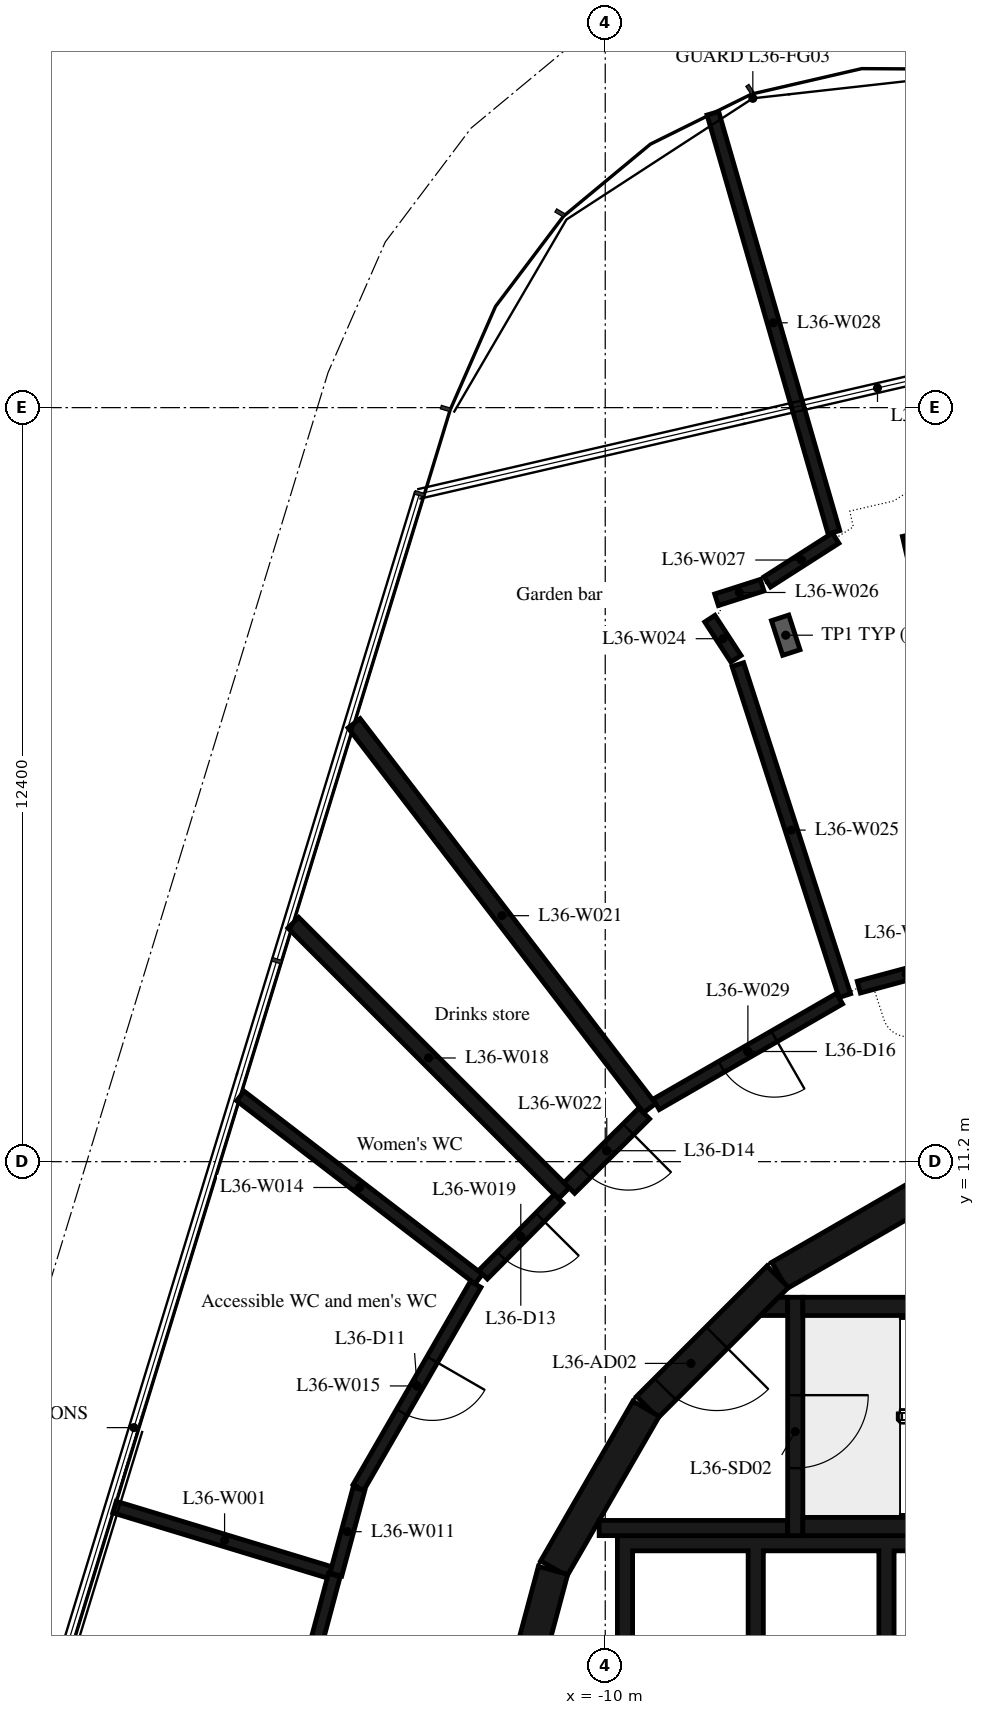
"""IFC4 building model, lengths in metres.
Left out: names, types, materials, properties, quantities, classifications, styles, units other than length and angle.
Written with IfcOpenShell. Run it as: python <this file> out.ifc"""

import sys

from ifc_helpers import new_model, si_unit, direction, frame, frame_2d, origin, place, context, subcontext, project, spatial, polyline, rectangle, outline, extrude, element, fill, save


model = new_model("IFC4")
c1 = context("Model", 3, precision=1e-05, world=origin(), true_north=direction((0.0, 1.0)))
c2 = subcontext(c1, "Body", "Model", "MODEL_VIEW")
j1 = project(units=[si_unit("LENGTHUNIT", "METRE"), si_unit("PLANEANGLEUNIT", "RADIAN")], contexts=[c1])
p1 = place(None, origin())
s1 = spatial("IfcSite", under=j1, at=p1, CompositionType="ELEMENT")
p2 = place(p1, origin())
s2 = spatial("IfcBuilding", under=s1, at=p2, CompositionType="ELEMENT")
p3 = place(p2, frame((0.0, 0.0, 144.9)))
s3 = spatial("IfcBuildingStorey", under=s2, at=p3, CompositionType="ELEMENT", Elevation=144.9)
p4 = place(p3, frame((-4.51, 10.845, 0.0), z_axis=(0.0, 0.0, 1.0), x_axis=(-0.865975092491, -0.500087131594, 0.0)))
e1 = element("IfcWall", 1, at=p4, inside=s3, PredefinedType="SHEAR", context=c2, shape_type="SweptSolid", body=[
    extrude(rectangle(XDim=3.033, YDim=0.5, at=frame_2d((1.516, 0.0))), origin(), (0.0, 0.0, 1.0), 6.35),
])
p5 = place(p3, frame((-7.164, 9.308, 0.0), z_axis=(0.0, 0.0, 1.0), x_axis=(-0.707106781187, -0.707106781187, 0.0)))
e2 = element("IfcWall", 2, at=p5, inside=s3, PredefinedType="SHEAR", context=c2, shape_type="SweptSolid", body=[
    extrude(rectangle(XDim=3.032, YDim=0.5, at=frame_2d((1.516, 0.0))), origin(), (0.0, 0.0, 1.0), 6.35),
])
p6 = place(p5, frame((1.416, 0.0, 0.0)))
e3 = element("IfcOpeningElement", 3, at=p6, cuts=e2, PredefinedType="OPENING", context=c2, shape_type="SweptSolid", body=[
    extrude(rectangle(XDim=1.2, YDim=2.1, at=frame_2d((0.6, 1.05))), frame((0.0, 0.26, 0.0), z_axis=(0.0, -1.0, 0.0), x_axis=(1.0, 0.0, 0.0)), (0.0, 0.0, 1.0), 0.52),
])
for number, where, z_axis, x_axis in (
    (4, (-9.329, 7.137, 0.0), (0.0, 0.0, 1.0), (-0.5, -0.866, 0.0)),
    (5, (-10.858, 4.479, 0.0), (0.0, 0.0, 1.0), (-0.259, -0.966, 0.0)),
):
    element("IfcWall", number, at=place(p3, frame(where, z_axis=z_axis, x_axis=x_axis)), inside=s3, PredefinedType="SHEAR", context=c2, shape_type="SweptSolid", body=[
        extrude(rectangle(XDim=3.033, YDim=0.5, at=frame_2d((1.516, 0.0))), origin(), (0.0, 0.0, 1.0), 6.35),
    ])
for number, where, z_axis, x_axis in (
    (6, (-6.75, 5.2, 0.0), (0.0, 0.0, 1.0), (1.0, 0.0, 0.0)),
    (7, (-6.75, 8.82, 0.0), (0.0, 0.0, 1.0), (1.0, 0.0, 0.0)),
):
    element("IfcWall", number, at=place(p3, frame(where, z_axis=z_axis, x_axis=x_axis)), inside=s3, PredefinedType="SHEAR", context=c2, shape_type="SweptSolid", body=[
        extrude(rectangle(XDim=6.75, YDim=0.3, at=frame_2d((3.375, 0.0))), origin(), (0.0, 0.0, 1.0), 6.35),
    ])
p7 = place(p3, frame((-6.875, 8.97, 0.0), z_axis=(0.0, 0.0, 1.0), x_axis=(0.0, -1.0, 0.0)))
e8 = element("IfcWall", 8, at=p7, inside=s3, PredefinedType="SHEAR", context=c2, shape_type="SweptSolid", body=[
    extrude(rectangle(XDim=3.92, YDim=0.25, at=frame_2d((1.96, 0.0))), origin(), (0.0, 0.0, 1.0), 6.35),
])
p8 = place(p7, frame((1.61, 0.0, 0.0)))
e9 = element("IfcOpeningElement", 9, at=p8, cuts=e8, PredefinedType="OPENING", context=c2, shape_type="SweptSolid", body=[
    extrude(rectangle(XDim=1.2, YDim=2.1, at=frame_2d((0.6, 1.05))), frame((0.0, 0.135, 0.0), z_axis=(0.0, -1.0, 0.0), x_axis=(1.0, 0.0, 0.0)), (0.0, 0.0, 1.0), 0.27),
])
p9 = place(p3, frame((-7.0, 5.175, 0.0), z_axis=(0.0, 0.0, 1.0), x_axis=(-1.0, 0.0, 0.0)))
e10 = element("IfcWall", 10, at=p9, inside=s3, PredefinedType="SHEAR", context=c2, shape_type="SweptSolid", body=[
    extrude(rectangle(XDim=3.1, YDim=0.25, at=frame_2d((1.55, 0.0))), origin(), (0.0, 0.0, 1.0), 6.35),
])
p10 = place(p3, origin())
e11 = element("IfcWall", 11, at=p10, inside=s3, PredefinedType="SHEAR", context=c2, shape_type="SweptSolid", body=[
    extrude(outline(polyline([(-7.148, 8.97), (-7.0, 8.97), (-7.0, 8.67), (-7.448, 8.67), (-7.148, 8.97)])), origin(), (0.0, 0.0, 1.0), 6.35),
])
p11 = place(p3, origin())
e12 = element("IfcWall", 12, at=p11, inside=s3, PredefinedType="SHEAR", context=c2, shape_type="SweptSolid", body=[
    extrude(outline(polyline([(-9.55, 4.8), (-7.65, 4.8), (-7.65, 1.9), (-7.4, 1.9), (-7.4, 4.8), (-5.5, 4.8), (-5.5, 1.9), (-5.25, 1.9), (-5.25, 4.8), (-3.35, 4.8), (-3.35, 1.9), (-3.1, 1.9), (-3.1, 4.8), (-1.2, 4.8), (-1.2, 1.9), (-0.95, 1.9), (-0.95, 4.8), (0.95, 4.8), (0.95, 1.9), (1.2, 1.9), (1.2, 4.8), (3.1, 4.8), (3.1, 1.9), (3.35, 1.9), (3.35, 4.8), (5.25, 4.8), (5.25, 1.9), (5.5, 1.9), (5.5, 4.8), (7.4, 4.8), (7.4, 1.9), (7.65, 1.9), (7.65, 4.8), (9.55, 4.8), (9.55, 1.9), (9.8, 1.9), (9.8, 4.8), (9.8, 5.05), (-9.8, 5.05), (-9.8, 4.8), (-9.8, 1.9), (-9.55, 1.9), (-9.55, 4.8)])), origin(), (0.0, 0.0, 1.0), 6.35),
])
p12 = place(p3, frame((-18.07, 5.52, 0.0), z_axis=(0.0, 0.0, 1.0), x_axis=(0.956797265316, -0.290755899482, 0.0)))
e13 = element("IfcWall", 13, at=p12, inside=s3, PredefinedType="PARTITIONING", context=c2, shape_type="SweptSolid", body=[
    extrude(rectangle(XDim=3.784, YDim=0.2, at=frame_2d((1.892, 0.0))), origin(), (0.0, 0.0, 1.0), 6.35),
])
p13 = place(p3, frame((-14.455, 4.402, 0.0), z_axis=(0.0, 0.0, 1.0), x_axis=(-0.258467872824, -0.966019854205, 0.0)))
e14 = element("IfcWall", 14, at=p13, inside=s3, PredefinedType="PARTITIONING", context=c2, shape_type="SweptSolid", body=[
    extrude(rectangle(XDim=2.396, YDim=0.2, at=frame_2d((1.198, 0.0))), origin(), (0.0, 0.0, 1.0), 6.35),
])
p14 = place(p3, frame((-14.05, 5.82, 0.0), z_axis=(0.0, 0.0, 1.0), x_axis=(-0.260117352512, -0.965577010353, 0.0)))
e15 = element("IfcWall", 15, at=p14, inside=s3, PredefinedType="PARTITIONING", context=c2, shape_type="SweptSolid", body=[
    extrude(rectangle(XDim=1.46, YDim=0.2, at=frame_2d((0.73, 0.0))), origin(), (0.0, 0.0, 1.0), 6.35),
])
p15 = place(p3, frame((-12.08, 9.27, 0.0), z_axis=(0.0, 0.0, 1.0), x_axis=(-0.793143396139, 0.609034935912, 0.0)))
e16 = element("IfcWall", 16, at=p15, inside=s3, PredefinedType="PARTITIONING", context=c2, shape_type="SweptSolid", body=[
    extrude(rectangle(XDim=4.942, YDim=0.2, at=frame_2d((2.471, 0.0))), origin(), (0.0, 0.0, 1.0), 6.35),
])
p16 = place(p3, frame((-12.13, 9.183, 0.0), z_axis=(0.0, 0.0, 1.0), x_axis=(-0.499988873232, -0.866031827731, 0.0)))
e17 = element("IfcWall", 17, at=p16, inside=s3, PredefinedType="PARTITIONING", context=c2, shape_type="SweptSolid", body=[
    extrude(rectangle(XDim=3.86, YDim=0.2, at=frame_2d((1.93, 0.0))), origin(), (0.0, 0.0, 1.0), 6.35),
])
p17 = place(p16, frame((1.43, 0.0, 0.0)))
e18 = element("IfcOpeningElement", 18, at=p17, cuts=e17, PredefinedType="OPENING", context=c2, shape_type="SweptSolid", body=[
    extrude(rectangle(XDim=1.0, YDim=2.1, at=frame_2d((0.5, 1.05))), frame((0.0, 0.11, 0.0), z_axis=(0.0, -1.0, 0.0), x_axis=(1.0, 0.0, 0.0)), (0.0, 0.0, 1.0), 0.22),
])
p18 = place(p3, frame((-10.68, 10.68, 0.0), z_axis=(0.0, 0.0, 1.0), x_axis=(-0.707106781187, 0.707106781187, 0.0)))
e19 = element("IfcWall", 19, at=p18, inside=s3, PredefinedType="PARTITIONING", context=c2, shape_type="SweptSolid", body=[
    extrude(rectangle(XDim=6.293, YDim=0.25, at=frame_2d((3.146, 0.0))), origin(), (0.0, 0.0, 1.0), 6.35),
])
p19 = place(p3, frame((-10.768, 10.591, 0.0), z_axis=(0.0, 0.0, 1.0), x_axis=(-0.704608193982, -0.709596570576, 0.0)))
e20 = element("IfcWall", 20, at=p19, inside=s3, PredefinedType="PARTITIONING", context=c2, shape_type="SweptSolid", body=[
    extrude(rectangle(XDim=1.762, YDim=0.2, at=frame_2d((0.881, 0.0))), origin(), (0.0, 0.0, 1.0), 6.35),
])
p20 = place(p19, frame((0.431, 0.0, 0.0)))
e21 = element("IfcOpeningElement", 21, at=p20, cuts=e20, PredefinedType="OPENING", context=c2, shape_type="SweptSolid", body=[
    extrude(rectangle(XDim=0.9, YDim=2.1, at=frame_2d((0.45, 1.05))), frame((0.0, 0.11, 0.0), z_axis=(0.0, -1.0, 0.0), x_axis=(1.0, 0.0, 0.0)), (0.0, 0.0, 1.0), 0.22),
])
p21 = place(p3, frame((-9.27, 12.08, 0.0), z_axis=(0.0, 0.0, 1.0), x_axis=(-0.608983097201, 0.793183199093, 0.0)))
e22 = element("IfcWall", 22, at=p21, inside=s3, PredefinedType="PARTITIONING", context=c2, shape_type="SweptSolid", body=[
    extrude(rectangle(XDim=7.98, YDim=0.25, at=frame_2d((3.99, 0.0))), origin(), (0.0, 0.0, 1.0), 6.35),
])
p22 = place(p3, frame((-9.359, 11.992, 0.0), z_axis=(0.0, 0.0, 1.0), x_axis=(-0.709632138317, -0.704572372625, 0.0)))
e23 = element("IfcWall", 23, at=p22, inside=s3, PredefinedType="PARTITIONING", context=c2, shape_type="SweptSolid", body=[
    extrude(rectangle(XDim=1.737, YDim=0.25, at=frame_2d((0.869, 0.0))), origin(), (0.0, 0.0, 1.0), 6.35),
])
p23 = place(p22, frame((0.368, 0.0, 0.0)))
e24 = element("IfcOpeningElement", 24, at=p23, cuts=e23, PredefinedType="OPENING", context=c2, shape_type="SweptSolid", body=[
    extrude(rectangle(XDim=1.0, YDim=2.1, at=frame_2d((0.5, 1.05))), frame((0.0, 0.135, 0.0), z_axis=(0.0, -1.0, 0.0), x_axis=(1.0, 0.0, 0.0)), (0.0, 0.0, 1.0), 0.27),
])
p24 = place(p3, frame((-8.28, 20.13, 0.0), z_axis=(0.0, 0.0, 1.0), x_axis=(0.545870586018, -0.83786950256, 0.0)))
e25 = element("IfcWall", 25, at=p24, inside=s3, PredefinedType="PARTITIONING", context=c2, shape_type="SweptSolid", body=[
    extrude(rectangle(XDim=0.788, YDim=0.2, at=frame_2d((0.394, 0.0))), origin(), (0.0, 0.0, 1.0), 6.35),
])
p25 = place(p3, frame((-7.819, 19.375, 0.0), z_axis=(0.0, 0.0, 1.0), x_axis=(0.307459013015, -0.951561325042, 0.0)))
e26 = element("IfcWall", 26, at=p25, inside=s3, PredefinedType="PARTITIONING", context=c2, shape_type="SweptSolid", body=[
    extrude(rectangle(XDim=5.722, YDim=0.2, at=frame_2d((2.861, 0.0))), origin(), (0.0, 0.0, 1.0), 6.35),
])
p26 = place(p3, frame((-7.42, 20.68, 0.0), z_axis=(0.0, 0.0, 1.0), x_axis=(-0.95242774696, -0.304764477624, 0.0)))
e27 = element("IfcWall", 27, at=p26, inside=s3, PredefinedType="PARTITIONING", context=c2, shape_type="SweptSolid", body=[
    extrude(rectangle(XDim=0.787, YDim=0.2, at=frame_2d((0.394, 0.0))), origin(), (0.0, 0.0, 1.0), 6.35),
])
p27 = place(p3, frame((-7.336, 20.734, 0.0), z_axis=(0.0, 0.0, 1.0), x_axis=(0.842258116514, 0.539074452341, 0.0)))
e28 = element("IfcWall", 28, at=p27, inside=s3, PredefinedType="PARTITIONING", context=c2, shape_type="SweptSolid", body=[
    extrude(rectangle(XDim=1.335, YDim=0.2, at=frame_2d((0.667, 0.0))), origin(), (0.0, 0.0, 1.0), 6.35),
])
p28 = place(p3, frame((-6.239, 21.55, 0.0), z_axis=(0.0, 0.0, 1.0), x_axis=(-0.277633208202, 0.960687150795, 0.0)))
e29 = element("IfcWall", 29, at=p28, inside=s3, PredefinedType="PARTITIONING", context=c2, shape_type="SweptSolid", body=[
    extrude(rectangle(XDim=7.172, YDim=0.2, at=frame_2d((3.586, 0.0))), origin(), (0.0, 0.0, 1.0), 6.35),
])
p29 = place(p3, frame((-6.147, 13.88, 0.0), z_axis=(0.0, 0.0, 1.0), x_axis=(-0.866380576307, -0.499384317933, 0.0)))
e30 = element("IfcWall", 30, at=p29, inside=s3, PredefinedType="PARTITIONING", context=c2, shape_type="SweptSolid", body=[
    extrude(rectangle(XDim=3.48, YDim=0.2, at=frame_2d((1.74, 0.0))), origin(), (0.0, 0.0, 1.0), 6.35),
])
p30 = place(p29, frame((1.24, 0.0, 0.0)))
e31 = element("IfcOpeningElement", 31, at=p30, cuts=e30, PredefinedType="OPENING", context=c2, shape_type="SweptSolid", body=[
    extrude(rectangle(XDim=1.0, YDim=2.1, at=frame_2d((0.5, 1.05))), frame((0.0, 0.11, 0.0), z_axis=(0.0, -1.0, 0.0), x_axis=(1.0, 0.0, 0.0)), (0.0, 0.0, 1.0), 0.22),
])
p31 = place(p3, frame((-4.27, 14.49, 0.0), z_axis=(0.0, 0.0, 1.0), x_axis=(-0.965630347497, -0.259919279764, 0.0)))
e32 = element("IfcWall", 32, at=p31, inside=s3, PredefinedType="PARTITIONING", context=c2, shape_type="SweptSolid", body=[
    extrude(rectangle(XDim=1.615, YDim=0.2, at=frame_2d((0.808, 0.0))), origin(), (0.0, 0.0, 1.0), 6.35),
])
p32 = place(p8, origin())
e33 = element("IfcDoor", 33, at=p32, inside=s3, OperationType="SINGLE_SWING_LEFT", PredefinedType="DOOR", context=c2, shape_type="SweptSolid", body=[
    extrude(rectangle(XDim=1.2, YDim=2.1, at=frame_2d((0.6, 1.05))), frame((0.0, 0.025, 0.0), z_axis=(0.0, -1.0, 0.0), x_axis=(1.0, 0.0, 0.0)), (0.0, 0.0, 1.0), 0.05),
])
fill(e9, e33)
p33 = place(p6, origin())
e34 = element("IfcDoor", 34, at=p33, inside=s3, OperationType="SINGLE_SWING_RIGHT", PredefinedType="DOOR", context=c2, shape_type="SweptSolid", body=[
    extrude(rectangle(XDim=1.2, YDim=2.1, at=frame_2d((0.6, 1.05))), frame((0.0, 0.025, 0.0), z_axis=(0.0, -1.0, 0.0), x_axis=(1.0, 0.0, 0.0)), (0.0, 0.0, 1.0), 0.05),
])
fill(e3, e34)
p34 = place(p17, origin())
e35 = element("IfcDoor", 35, at=p34, inside=s3, OperationType="SINGLE_SWING_LEFT", PredefinedType="DOOR", context=c2, shape_type="SweptSolid", body=[
    extrude(rectangle(XDim=1.0, YDim=2.1, at=frame_2d((0.5, 1.05))), frame((0.0, 0.025, 0.0), z_axis=(0.0, -1.0, 0.0), x_axis=(1.0, 0.0, 0.0)), (0.0, 0.0, 1.0), 0.05),
])
fill(e18, e35)
p35 = place(p20, origin())
e36 = element("IfcDoor", 36, at=p35, inside=s3, OperationType="SINGLE_SWING_LEFT", PredefinedType="DOOR", context=c2, shape_type="SweptSolid", body=[
    extrude(rectangle(XDim=0.9, YDim=2.1, at=frame_2d((0.45, 1.05))), frame((0.0, 0.025, 0.0), z_axis=(0.0, -1.0, 0.0), x_axis=(1.0, 0.0, 0.0)), (0.0, 0.0, 1.0), 0.05),
])
fill(e21, e36)
p36 = place(p23, origin())
e37 = element("IfcDoor", 37, at=p36, inside=s3, OperationType="SINGLE_SWING_LEFT", PredefinedType="DOOR", context=c2, shape_type="SweptSolid", body=[
    extrude(rectangle(XDim=1.0, YDim=2.1, at=frame_2d((0.5, 1.05))), frame((0.0, 0.025, 0.0), z_axis=(0.0, -1.0, 0.0), x_axis=(1.0, 0.0, 0.0)), (0.0, 0.0, 1.0), 0.05),
])
fill(e24, e37)
p37 = place(p30, origin())
e38 = element("IfcDoor", 38, at=p37, inside=s3, OperationType="SINGLE_SWING_LEFT", PredefinedType="DOOR", context=c2, shape_type="SweptSolid", body=[
    extrude(rectangle(XDim=1.0, YDim=2.1, at=frame_2d((0.5, 1.05))), frame((0.0, 0.025, 0.0), z_axis=(0.0, -1.0, 0.0), x_axis=(1.0, 0.0, 0.0)), (0.0, 0.0, 1.0), 0.05),
])
fill(e31, e38)
save(model, sys.argv[1])
